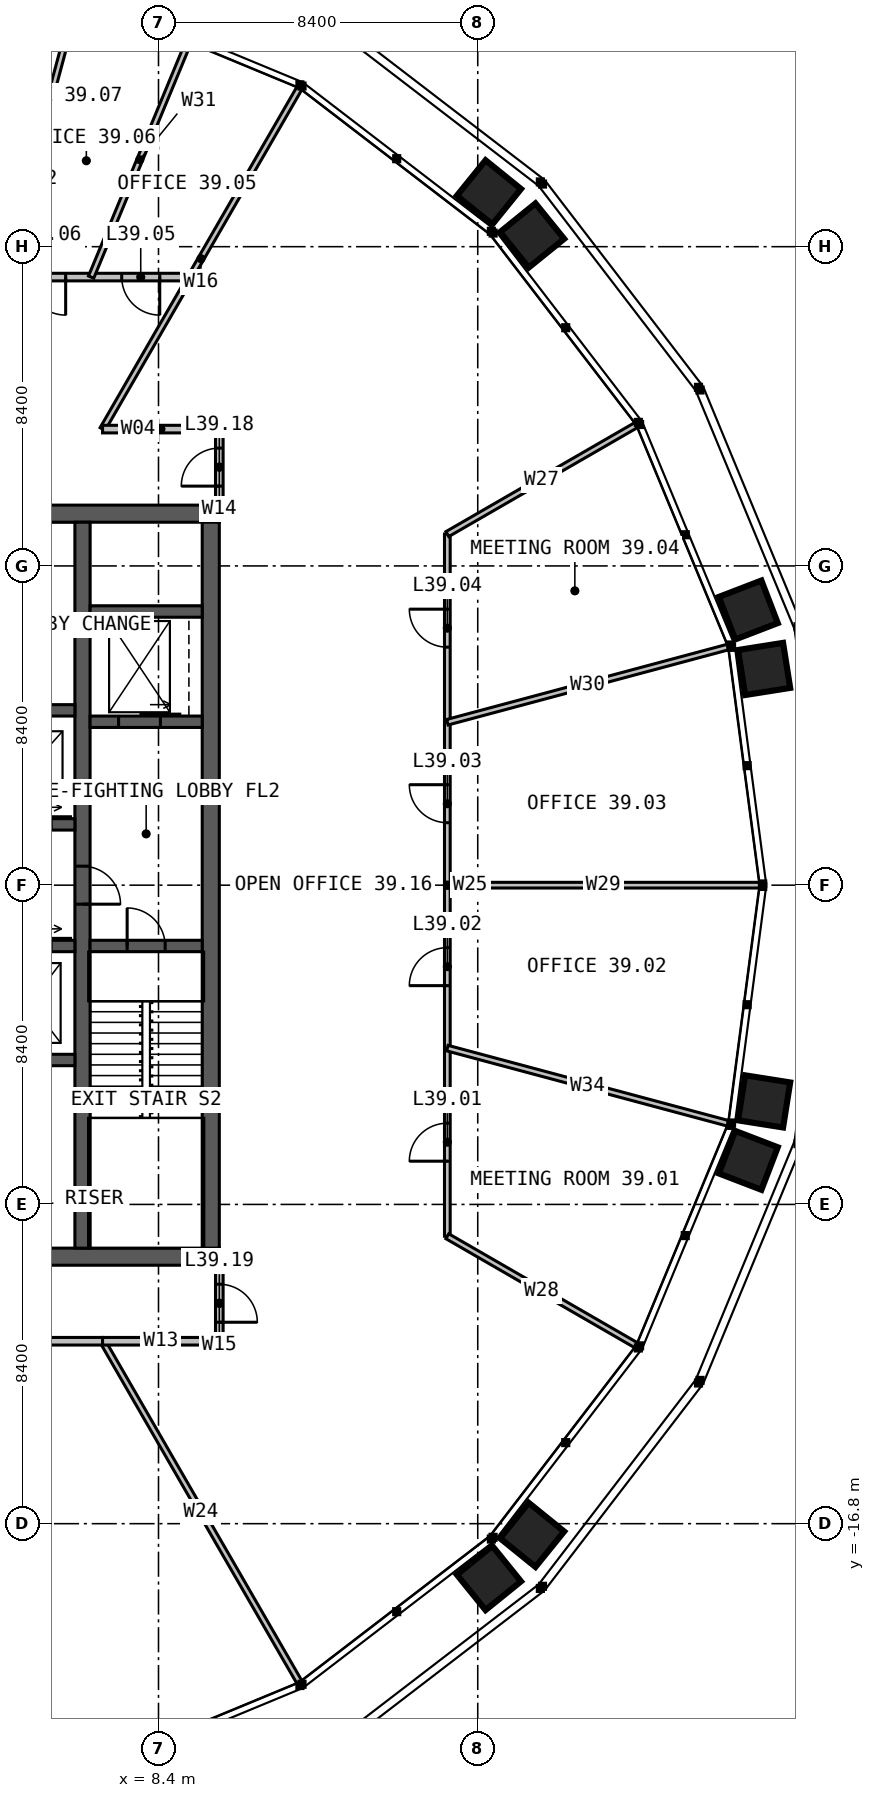
"""IFC4 building model, lengths in metres.
Left out: names, types, materials, properties, quantities, classifications, styles, units other than length and angle.
Written with IfcOpenShell. Run it as: python <this file> out.ifc"""

import sys

from ifc_helpers import new_model, si_unit, direction, frame, frame_2d, origin, place, context, subcontext, project, spatial, rectangle, extrude, element, fill, save


model = new_model("IFC4")
c1 = context("Model", 3, precision=1e-05, world=origin(), true_north=direction((0.0, 1.0)))
c2 = subcontext(c1, "Body", "Model", "MODEL_VIEW")
j1 = project(units=[si_unit("LENGTHUNIT", "METRE"), si_unit("PLANEANGLEUNIT", "RADIAN")], contexts=[c1])
p1 = place(None, origin())
s1 = spatial("IfcSite", under=j1, at=p1, CompositionType="ELEMENT")
p2 = place(p1, origin())
s2 = spatial("IfcBuilding", under=s1, at=p2, CompositionType="ELEMENT")
p3 = place(p2, frame((0.0, 0.0, 163.0)))
s3 = spatial("IfcBuildingStorey", under=s2, at=p3, CompositionType="ELEMENT", Elevation=163.0)
p4 = place(p3, frame((-10.0, 9.775, 0.0), z_axis=(0.0, 0.0, 1.0), x_axis=(1.0, 0.0, 0.0)))
e1 = element("IfcWall", 1, at=p4, inside=s3, PredefinedType="SOLIDWALL", context=c2, shape_type="SweptSolid", body=[
    extrude(rectangle(XDim=20.0, YDim=0.45, at=frame_2d((10.0, 0.0))), origin(), (0.0, 0.0, 1.0), 4.0),
])
p5 = place(p4, frame((9.4, 0.0, 0.0)))
e2 = element("IfcOpeningElement", 2, at=p5, cuts=e1, PredefinedType="OPENING", context=c2, shape_type="SweptSolid", body=[
    extrude(rectangle(XDim=1.2, YDim=2.2, at=frame_2d((0.6, 1.1))), frame((0.0, 0.235, 0.0), z_axis=(0.0, -1.0, 0.0), x_axis=(1.0, 0.0, 0.0)), (0.0, 0.0, 1.0), 0.47),
])
p6 = place(p3, frame((10.0, -9.775, 0.0), z_axis=(0.0, 0.0, 1.0), x_axis=(-1.0, 0.0, 0.0)))
e3 = element("IfcWall", 3, at=p6, inside=s3, PredefinedType="SOLIDWALL", context=c2, shape_type="SweptSolid", body=[
    extrude(rectangle(XDim=20.0, YDim=0.45, at=frame_2d((10.0, 0.0))), origin(), (0.0, 0.0, 1.0), 4.0),
])
p7 = place(p6, frame((6.875, 0.0, 0.0)))
e4 = element("IfcOpeningElement", 4, at=p7, cuts=e3, PredefinedType="OPENING", context=c2, shape_type="SweptSolid", body=[
    extrude(rectangle(XDim=1.2, YDim=2.2, at=frame_2d((0.6, 1.1))), frame((0.0, 0.235, 0.0), z_axis=(0.0, -1.0, 0.0), x_axis=(1.0, 0.0, 0.0)), (0.0, 0.0, 1.0), 0.47),
])
p8 = place(p3, frame((9.775, -9.55, 0.0), z_axis=(0.0, 0.0, 1.0), x_axis=(0.0, 1.0, 0.0)))
e5 = element("IfcWall", 5, at=p8, inside=s3, PredefinedType="SOLIDWALL", context=c2, shape_type="SweptSolid", body=[
    extrude(rectangle(XDim=19.1, YDim=0.45, at=frame_2d((9.55, 0.0))), origin(), (0.0, 0.0, 1.0), 4.0),
])
p9 = place(p3, frame((6.4, 9.55, 0.0), z_axis=(0.0, 0.0, 1.0), x_axis=(0.0, -1.0, 0.0)))
e6 = element("IfcWall", 6, at=p9, inside=s3, PredefinedType="SOLIDWALL", context=c2, shape_type="SweptSolid", body=[
    extrude(rectangle(XDim=19.1, YDim=0.4, at=frame_2d((9.55, 0.0))), origin(), (0.0, 0.0, 1.0), 4.0),
])
p10 = place(p9, frame((9.05, 0.0, 0.0)))
e7 = element("IfcOpeningElement", 7, at=p10, cuts=e6, PredefinedType="OPENING", context=c2, shape_type="SweptSolid", body=[
    extrude(rectangle(XDim=1.0, YDim=2.2, at=frame_2d((0.5, 1.1))), frame((0.0, 0.21, 0.0), z_axis=(0.0, -1.0, 0.0), x_axis=(1.0, 0.0, 0.0)), (0.0, 0.0, 1.0), 0.42),
])
p11 = place(p3, frame((1.35, 1.6, 0.0), z_axis=(0.0, 0.0, 1.0), x_axis=(1.0, 0.0, 0.0)))
e8 = element("IfcWall", 8, at=p11, inside=s3, PredefinedType="SOLIDWALL", context=c2, shape_type="SweptSolid", body=[
    extrude(rectangle(XDim=4.85, YDim=0.3, at=frame_2d((2.425, 0.0))), origin(), (0.0, 0.0, 1.0), 4.0),
])
p12 = place(p11, frame((0.6, 0.0, 0.0)))
e9 = element("IfcOpeningElement", 9, at=p12, cuts=e8, PredefinedType="OPENING", context=c2, shape_type="SweptSolid", body=[
    extrude(rectangle(XDim=1.1, YDim=2.2, at=frame_2d((0.55, 1.1))), frame((0.0, 0.16, 0.0), z_axis=(0.0, -1.0, 0.0), x_axis=(1.0, 0.0, 0.0)), (0.0, 0.0, 1.0), 0.32),
])
p13 = place(p11, frame((3.125, 0.0, 0.0)))
e10 = element("IfcOpeningElement", 10, at=p13, cuts=e8, PredefinedType="OPENING", context=c2, shape_type="SweptSolid", body=[
    extrude(rectangle(XDim=1.1, YDim=2.2, at=frame_2d((0.55, 1.1))), frame((0.0, 0.16, 0.0), z_axis=(0.0, -1.0, 0.0), x_axis=(1.0, 0.0, 0.0)), (0.0, 0.0, 1.0), 0.32),
])
p14 = place(p3, frame((1.35, 4.6, 0.0), z_axis=(0.0, 0.0, 1.0), x_axis=(1.0, 0.0, 0.0)))
e11 = element("IfcWall", 11, at=p14, inside=s3, PredefinedType="SOLIDWALL", context=c2, shape_type="SweptSolid", body=[
    extrude(rectangle(XDim=4.85, YDim=0.3, at=frame_2d((2.425, 0.0))), origin(), (0.0, 0.0, 1.0), 4.0),
])
p15 = place(p3, frame((3.85, -1.6, 0.0), z_axis=(0.0, 0.0, 1.0), x_axis=(1.0, 0.0, 0.0)))
e12 = element("IfcWall", 12, at=p15, inside=s3, PredefinedType="SOLIDWALL", context=c2, shape_type="SweptSolid", body=[
    extrude(rectangle(XDim=2.35, YDim=0.3, at=frame_2d((1.175, 0.0))), origin(), (0.0, 0.0, 1.0), 4.0),
])
p16 = place(p15, frame((0.625, 0.0, 0.0)))
e13 = element("IfcOpeningElement", 13, at=p16, cuts=e12, PredefinedType="OPENING", context=c2, shape_type="SweptSolid", body=[
    extrude(rectangle(XDim=1.1, YDim=2.2, at=frame_2d((0.55, 1.1))), frame((0.0, 0.16, 0.0), z_axis=(0.0, -1.0, 0.0), x_axis=(1.0, 0.0, 0.0)), (0.0, 0.0, 1.0), 0.32),
])
p17 = place(p3, frame((3.85, -4.6, 0.0), z_axis=(0.0, 0.0, 1.0), x_axis=(1.0, 0.0, 0.0)))
e14 = element("IfcWall", 14, at=p17, inside=s3, PredefinedType="SOLIDWALL", context=c2, shape_type="SweptSolid", body=[
    extrude(rectangle(XDim=2.35, YDim=0.3, at=frame_2d((1.175, 0.0))), origin(), (0.0, 0.0, 1.0), 4.0),
])
p18 = place(p3, frame((6.6, -1.6, 0.0), z_axis=(0.0, 0.0, 1.0), x_axis=(1.0, 0.0, 0.0)))
e15 = element("IfcWall", 15, at=p18, inside=s3, PredefinedType="SOLIDWALL", context=c2, shape_type="SweptSolid", body=[
    extrude(rectangle(XDim=2.95, YDim=0.3, at=frame_2d((1.475, 0.0))), origin(), (0.0, 0.0, 1.0), 4.0),
])
p19 = place(p18, frame((0.975, 0.0, 0.0)))
e16 = element("IfcOpeningElement", 16, at=p19, cuts=e15, PredefinedType="OPENING", context=c2, shape_type="SweptSolid", body=[
    extrude(rectangle(XDim=1.0, YDim=2.2, at=frame_2d((0.5, 1.1))), frame((0.0, 0.16, 0.0), z_axis=(0.0, -1.0, 0.0), x_axis=(1.0, 0.0, 0.0)), (0.0, 0.0, 1.0), 0.32),
])
p20 = place(p3, frame((6.6, 4.3, 0.0), z_axis=(0.0, 0.0, 1.0), x_axis=(1.0, 0.0, 0.0)))
e17 = element("IfcWall", 17, at=p20, inside=s3, PredefinedType="SOLIDWALL", context=c2, shape_type="SweptSolid", body=[
    extrude(rectangle(XDim=2.95, YDim=0.3, at=frame_2d((1.475, 0.0))), origin(), (0.0, 0.0, 1.0), 4.0),
])
p21 = place(p20, frame((0.75, 0.0, 0.0)))
e18 = element("IfcOpeningElement", 18, at=p21, cuts=e17, PredefinedType="OPENING", context=c2, shape_type="SweptSolid", body=[
    extrude(rectangle(XDim=1.1, YDim=2.2, at=frame_2d((0.55, 1.1))), frame((0.0, 0.16, 0.0), z_axis=(0.0, -1.0, 0.0), x_axis=(1.0, 0.0, 0.0)), (0.0, 0.0, 1.0), 0.32),
])
p22 = place(p3, frame((6.6, 7.2, 0.0), z_axis=(0.0, 0.0, 1.0), x_axis=(1.0, 0.0, 0.0)))
e19 = element("IfcWall", 19, at=p22, inside=s3, PredefinedType="SOLIDWALL", context=c2, shape_type="SweptSolid", body=[
    extrude(rectangle(XDim=2.95, YDim=0.3, at=frame_2d((1.475, 0.0))), origin(), (0.0, 0.0, 1.0), 4.0),
])
p23 = place(p3, frame((1.35, 6.8, 0.0), z_axis=(0.0, 0.0, 1.0), x_axis=(1.0, 0.0, 0.0)))
e20 = element("IfcWall", 20, at=p23, inside=s3, PredefinedType="PARTITIONING", context=c2, shape_type="SweptSolid", body=[
    extrude(rectangle(XDim=4.85, YDim=0.15, at=frame_2d((2.425, 0.0))), origin(), (0.0, 0.0, 1.0), 3.75),
])
for number, where, z_axis, x_axis in (
    (21, (6.928, 12.0, 0.0), (0.0, 0.0, 1.0), (0.5, 0.866, 0.0)),
    (22, (6.928, -12.0, 0.0), (0.0, 0.0, 1.0), (0.5, -0.866, 0.0)),
):
    element("IfcWall", number, at=place(p3, frame(where, z_axis=z_axis, x_axis=x_axis)), inside=s3, PredefinedType="PARTITIONING", context=c2, shape_type="SweptSolid", body=[
        extrude(rectangle(XDim=10.355, YDim=0.15, at=frame_2d((5.177, 0.0))), origin(), (0.0, 0.0, 1.0), 2.79),
    ])
p24 = place(p3, frame((16.0, -9.238, 0.0), z_axis=(0.0, 0.0, 1.0), x_axis=(0.0, 1.0, 0.0)))
e23 = element("IfcWall", 23, at=p24, inside=s3, PredefinedType="PARTITIONING", context=c2, shape_type="SweptSolid", body=[
    extrude(rectangle(XDim=18.475, YDim=0.15, at=frame_2d((9.238, 0.0))), origin(), (0.0, 0.0, 1.0), 2.79),
])
p25 = place(p24, frame((1.975, 0.0, 0.0)))
e24 = element("IfcOpeningElement", 24, at=p25, cuts=e23, PredefinedType="OPENING", context=c2, shape_type="SweptSolid", body=[
    extrude(rectangle(XDim=1.0, YDim=2.2, at=frame_2d((0.5, 1.1))), frame((0.0, 0.085, 0.0), z_axis=(0.0, -1.0, 0.0), x_axis=(1.0, 0.0, 0.0)), (0.0, 0.0, 1.0), 0.17),
])
p26 = place(p24, frame((6.594, 0.0, 0.0)))
e25 = element("IfcOpeningElement", 25, at=p26, cuts=e23, PredefinedType="OPENING", context=c2, shape_type="SweptSolid", body=[
    extrude(rectangle(XDim=1.0, YDim=2.2, at=frame_2d((0.5, 1.1))), frame((0.0, 0.085, 0.0), z_axis=(0.0, -1.0, 0.0), x_axis=(1.0, 0.0, 0.0)), (0.0, 0.0, 1.0), 0.17),
])
p27 = place(p24, frame((10.881, 0.0, 0.0)))
e26 = element("IfcOpeningElement", 26, at=p27, cuts=e23, PredefinedType="OPENING", context=c2, shape_type="SweptSolid", body=[
    extrude(rectangle(XDim=1.0, YDim=2.2, at=frame_2d((0.5, 1.1))), frame((0.0, 0.085, 0.0), z_axis=(0.0, -1.0, 0.0), x_axis=(1.0, 0.0, 0.0)), (0.0, 0.0, 1.0), 0.17),
])
p28 = place(p24, frame((15.5, 0.0, 0.0)))
e27 = element("IfcOpeningElement", 27, at=p28, cuts=e23, PredefinedType="OPENING", context=c2, shape_type="SweptSolid", body=[
    extrude(rectangle(XDim=1.0, YDim=2.2, at=frame_2d((0.5, 1.1))), frame((0.0, 0.085, 0.0), z_axis=(0.0, -1.0, 0.0), x_axis=(1.0, 0.0, 0.0)), (0.0, 0.0, 1.0), 0.17),
])
for number, where, z_axis, x_axis in (
    (28, (16.0, -9.238, 0.0), (0.0, 0.0, 1.0), (0.866, -0.5, 0.0)),
    (29, (16.0, 9.238, 0.0), (0.0, 0.0, 1.0), (0.866, 0.5, 0.0)),
):
    element("IfcWall", number, at=place(p3, frame(where, z_axis=z_axis, x_axis=x_axis)), inside=s3, PredefinedType="PARTITIONING", context=c2, shape_type="SweptSolid", body=[
        extrude(rectangle(XDim=5.736, YDim=0.15, at=frame_2d((2.868, 0.0))), origin(), (0.0, 0.0, 1.0), 2.79),
    ])
p29 = place(p3, frame((16.0, -4.287, 0.0), z_axis=(0.0, 0.0, 1.0), x_axis=(0.965922113611, -0.25883290061, 0.0)))
e30 = element("IfcWall", 30, at=p29, inside=s3, PredefinedType="PARTITIONING", context=c2, shape_type="SweptSolid", body=[
    extrude(rectangle(XDim=7.647, YDim=0.15, at=frame_2d((3.823, 0.0))), origin(), (0.0, 0.0, 1.0), 2.79),
])
p30 = place(p3, frame((16.0, 0.0, 0.0), z_axis=(0.0, 0.0, 1.0), x_axis=(1.0, 0.0, 0.0)))
e31 = element("IfcWall", 31, at=p30, inside=s3, PredefinedType="PARTITIONING", context=c2, shape_type="SweptSolid", body=[
    extrude(rectangle(XDim=8.211, YDim=0.15, at=frame_2d((4.105, 0.0))), origin(), (0.0, 0.0, 1.0), 2.79),
])
p31 = place(p3, frame((16.0, 4.287, 0.0), z_axis=(0.0, 0.0, 1.0), x_axis=(0.965922113611, 0.25883290061, 0.0)))
e32 = element("IfcWall", 32, at=p31, inside=s3, PredefinedType="PARTITIONING", context=c2, shape_type="SweptSolid", body=[
    extrude(rectangle(XDim=7.647, YDim=0.15, at=frame_2d((3.823, 0.0))), origin(), (0.0, 0.0, 1.0), 2.79),
])
p32 = place(p3, frame((10.0, 12.0, 0.0), z_axis=(0.0, 0.0, 1.0), x_axis=(-1.0, 0.0, 0.0)))
e33 = element("IfcWall", 33, at=p32, inside=s3, PredefinedType="PARTITIONING", context=c2, shape_type="SweptSolid", body=[
    extrude(rectangle(XDim=3.072, YDim=0.2, at=frame_2d((1.536, 0.0))), origin(), (0.0, 0.0, 1.0), 3.8),
])
p33 = place(p3, frame((9.238, 16.0, 0.0), z_axis=(0.0, 0.0, 1.0), x_axis=(-1.0, 0.0, 0.0)))
e34 = element("IfcWall", 34, at=p33, inside=s3, PredefinedType="PARTITIONING", context=c2, shape_type="SweptSolid", body=[
    extrude(rectangle(XDim=9.238, YDim=0.2, at=frame_2d((4.619, 0.0))), origin(), (0.0, 0.0, 1.0), 3.8),
])
p34 = place(p33, frame((0.805, 0.0, 0.0)))
e35 = element("IfcOpeningElement", 35, at=p34, cuts=e34, PredefinedType="OPENING", context=c2, shape_type="SweptSolid", body=[
    extrude(rectangle(XDim=1.0, YDim=2.2, at=frame_2d((0.5, 1.1))), frame((0.0, 0.11, 0.0), z_axis=(0.0, -1.0, 0.0), x_axis=(1.0, 0.0, 0.0)), (0.0, 0.0, 1.0), 0.22),
])
p35 = place(p33, frame((3.28, 0.0, 0.0)))
e36 = element("IfcOpeningElement", 36, at=p35, cuts=e34, PredefinedType="OPENING", context=c2, shape_type="SweptSolid", body=[
    extrude(rectangle(XDim=1.0, YDim=2.2, at=frame_2d((0.5, 1.1))), frame((0.0, 0.11, 0.0), z_axis=(0.0, -1.0, 0.0), x_axis=(1.0, 0.0, 0.0)), (0.0, 0.0, 1.0), 0.22),
])
p36 = place(p33, frame((5.541, 0.0, 0.0)))
e37 = element("IfcOpeningElement", 37, at=p36, cuts=e34, PredefinedType="OPENING", context=c2, shape_type="SweptSolid", body=[
    extrude(rectangle(XDim=1.0, YDim=2.2, at=frame_2d((0.5, 1.1))), frame((0.0, 0.11, 0.0), z_axis=(0.0, -1.0, 0.0), x_axis=(1.0, 0.0, 0.0)), (0.0, 0.0, 1.0), 0.22),
])
p37 = place(p33, frame((7.684, 0.0, 0.0)))
e38 = element("IfcOpeningElement", 38, at=p37, cuts=e34, PredefinedType="OPENING", context=c2, shape_type="SweptSolid", body=[
    extrude(rectangle(XDim=1.0, YDim=2.2, at=frame_2d((0.5, 1.1))), frame((0.0, 0.11, 0.0), z_axis=(0.0, -1.0, 0.0), x_axis=(1.0, 0.0, 0.0)), (0.0, 0.0, 1.0), 0.22),
])
p38 = place(p3, frame((6.627, 16.0, 0.0), z_axis=(0.0, 0.0, 1.0), x_axis=(0.382682891863, 0.923879756395, 0.0)))
e39 = element("IfcWall", 39, at=p38, inside=s3, PredefinedType="PARTITIONING", context=c2, shape_type="SweptSolid", body=[
    extrude(rectangle(XDim=6.686, YDim=0.15, at=frame_2d((3.343, 0.0))), origin(), (0.0, 0.0, 1.0), 2.79),
])
p39 = place(p3, frame((4.287, 16.0, 0.0), z_axis=(0.0, 0.0, 1.0), x_axis=(0.25883290061, 0.965922113611, 0.0)))
e40 = element("IfcWall", 40, at=p39, inside=s3, PredefinedType="PARTITIONING", context=c2, shape_type="SweptSolid", body=[
    extrude(rectangle(XDim=7.647, YDim=0.15, at=frame_2d((3.823, 0.0))), origin(), (0.0, 0.0, 1.0), 2.79),
])
p40 = place(p3, frame((-6.928, -12.0, 0.0), z_axis=(0.0, 0.0, 1.0), x_axis=(1.0, 0.0, 0.0)))
e41 = element("IfcWall", 41, at=p40, inside=s3, PredefinedType="PARTITIONING", context=c2, shape_type="SweptSolid", body=[
    extrude(rectangle(XDim=13.856, YDim=0.2, at=frame_2d((6.928, 0.0))), origin(), (0.0, 0.0, 1.0), 3.8),
])
p41 = place(p40, frame((6.028, 0.0, 0.0)))
e42 = element("IfcOpeningElement", 42, at=p41, cuts=e41, PredefinedType="OPENING", context=c2, shape_type="SweptSolid", body=[
    extrude(rectangle(XDim=1.8, YDim=2.2, at=frame_2d((0.9, 1.1))), frame((0.0, 0.11, 0.0), z_axis=(0.0, -1.0, 0.0), x_axis=(1.0, 0.0, 0.0)), (0.0, 0.0, 1.0), 0.22),
])
p42 = place(p3, frame((6.928, -12.0, 0.0), z_axis=(0.0, 0.0, 1.0), x_axis=(1.0, 0.0, 0.0)))
e43 = element("IfcWall", 43, at=p42, inside=s3, PredefinedType="PARTITIONING", context=c2, shape_type="SweptSolid", body=[
    extrude(rectangle(XDim=3.072, YDim=0.2, at=frame_2d((1.536, 0.0))), origin(), (0.0, 0.0, 1.0), 3.8),
])
p43 = place(p3, frame((10.0, 10.0, 0.0), z_axis=(0.0, 0.0, 1.0), x_axis=(0.0, 1.0, 0.0)))
e44 = element("IfcWall", 44, at=p43, inside=s3, PredefinedType="PARTITIONING", context=c2, shape_type="SweptSolid", body=[
    extrude(rectangle(XDim=2.0, YDim=0.2, at=frame_2d((1.0, 0.0))), origin(), (0.0, 0.0, 1.0), 3.8),
])
p44 = place(p43, frame((0.5, 0.0, 0.0)))
e45 = element("IfcOpeningElement", 45, at=p44, cuts=e44, PredefinedType="OPENING", context=c2, shape_type="SweptSolid", body=[
    extrude(rectangle(XDim=1.0, YDim=2.2, at=frame_2d((0.5, 1.1))), frame((0.0, 0.11, 0.0), z_axis=(0.0, -1.0, 0.0), x_axis=(1.0, 0.0, 0.0)), (0.0, 0.0, 1.0), 0.22),
])
p45 = place(p3, frame((10.0, -10.0, 0.0), z_axis=(0.0, 0.0, 1.0), x_axis=(0.0, -1.0, 0.0)))
e46 = element("IfcWall", 46, at=p45, inside=s3, PredefinedType="PARTITIONING", context=c2, shape_type="SweptSolid", body=[
    extrude(rectangle(XDim=2.0, YDim=0.2, at=frame_2d((1.0, 0.0))), origin(), (0.0, 0.0, 1.0), 3.8),
])
p46 = place(p45, frame((0.5, 0.0, 0.0)))
e47 = element("IfcOpeningElement", 47, at=p46, cuts=e46, PredefinedType="OPENING", context=c2, shape_type="SweptSolid", body=[
    extrude(rectangle(XDim=1.0, YDim=2.2, at=frame_2d((0.5, 1.1))), frame((0.0, 0.11, 0.0), z_axis=(0.0, -1.0, 0.0), x_axis=(1.0, 0.0, 0.0)), (0.0, 0.0, 1.0), 0.22),
])
p47 = place(p10, origin())
e48 = element("IfcDoor", 48, at=p47, inside=s3, OperationType="SINGLE_SWING_RIGHT", PredefinedType="DOOR", context=c2, shape_type="SweptSolid", body=[
    extrude(rectangle(XDim=1.0, YDim=2.2, at=frame_2d((0.5, 1.1))), frame((0.0, 0.025, 0.0), z_axis=(0.0, -1.0, 0.0), x_axis=(1.0, 0.0, 0.0)), (0.0, 0.0, 1.0), 0.05),
])
fill(e7, e48)
p48 = place(p19, origin())
e49 = element("IfcDoor", 49, at=p48, inside=s3, OperationType="SINGLE_SWING_LEFT", PredefinedType="DOOR", context=c2, shape_type="SweptSolid", body=[
    extrude(rectangle(XDim=1.0, YDim=2.2, at=frame_2d((0.5, 1.1))), frame((0.0, 0.025, 0.0), z_axis=(0.0, -1.0, 0.0), x_axis=(1.0, 0.0, 0.0)), (0.0, 0.0, 1.0), 0.05),
])
fill(e16, e49)
p49 = place(p21, origin())
e50 = element("IfcDoor", 50, at=p49, inside=s3, OperationType="SLIDING_TO_LEFT", PredefinedType="DOOR", context=c2, shape_type="SweptSolid", body=[
    extrude(rectangle(XDim=1.1, YDim=2.2, at=frame_2d((0.55, 1.1))), frame((0.0, 0.025, 0.0), z_axis=(0.0, -1.0, 0.0), x_axis=(1.0, 0.0, 0.0)), (0.0, 0.0, 1.0), 0.05),
])
fill(e18, e50)
p50 = place(p25, origin())
e51 = element("IfcDoor", 51, at=p50, inside=s3, OperationType="SINGLE_SWING_LEFT", PredefinedType="DOOR", context=c2, shape_type="SweptSolid", body=[
    extrude(rectangle(XDim=1.0, YDim=2.2, at=frame_2d((0.5, 1.1))), frame((0.0, 0.025, 0.0), z_axis=(0.0, -1.0, 0.0), x_axis=(1.0, 0.0, 0.0)), (0.0, 0.0, 1.0), 0.05),
])
fill(e24, e51)
p51 = place(p26, origin())
e52 = element("IfcDoor", 52, at=p51, inside=s3, OperationType="SINGLE_SWING_LEFT", PredefinedType="DOOR", context=c2, shape_type="SweptSolid", body=[
    extrude(rectangle(XDim=1.0, YDim=2.2, at=frame_2d((0.5, 1.1))), frame((0.0, 0.025, 0.0), z_axis=(0.0, -1.0, 0.0), x_axis=(1.0, 0.0, 0.0)), (0.0, 0.0, 1.0), 0.05),
])
fill(e25, e52)
p52 = place(p27, origin())
e53 = element("IfcDoor", 53, at=p52, inside=s3, OperationType="SINGLE_SWING_RIGHT", PredefinedType="DOOR", context=c2, shape_type="SweptSolid", body=[
    extrude(rectangle(XDim=1.0, YDim=2.2, at=frame_2d((0.5, 1.1))), frame((0.0, 0.025, 0.0), z_axis=(0.0, -1.0, 0.0), x_axis=(1.0, 0.0, 0.0)), (0.0, 0.0, 1.0), 0.05),
])
fill(e26, e53)
p53 = place(p28, origin())
e54 = element("IfcDoor", 54, at=p53, inside=s3, OperationType="SINGLE_SWING_RIGHT", PredefinedType="DOOR", context=c2, shape_type="SweptSolid", body=[
    extrude(rectangle(XDim=1.0, YDim=2.2, at=frame_2d((0.5, 1.1))), frame((0.0, 0.025, 0.0), z_axis=(0.0, -1.0, 0.0), x_axis=(1.0, 0.0, 0.0)), (0.0, 0.0, 1.0), 0.05),
])
fill(e27, e54)
p54 = place(p34, origin())
e55 = element("IfcDoor", 55, at=p54, inside=s3, OperationType="SINGLE_SWING_LEFT", PredefinedType="DOOR", context=c2, shape_type="SweptSolid", body=[
    extrude(rectangle(XDim=1.0, YDim=2.2, at=frame_2d((0.5, 1.1))), frame((0.0, 0.025, 0.0), z_axis=(0.0, -1.0, 0.0), x_axis=(1.0, 0.0, 0.0)), (0.0, 0.0, 1.0), 0.05),
])
fill(e35, e55)
p55 = place(p35, origin())
e56 = element("IfcDoor", 56, at=p55, inside=s3, OperationType="SINGLE_SWING_LEFT", PredefinedType="DOOR", context=c2, shape_type="SweptSolid", body=[
    extrude(rectangle(XDim=1.0, YDim=2.2, at=frame_2d((0.5, 1.1))), frame((0.0, 0.025, 0.0), z_axis=(0.0, -1.0, 0.0), x_axis=(1.0, 0.0, 0.0)), (0.0, 0.0, 1.0), 0.05),
])
fill(e36, e56)
p56 = place(p44, origin())
e57 = element("IfcDoor", 57, at=p56, inside=s3, OperationType="SINGLE_SWING_LEFT", PredefinedType="DOOR", context=c2, shape_type="SweptSolid", body=[
    extrude(rectangle(XDim=1.0, YDim=2.2, at=frame_2d((0.5, 1.1))), frame((0.0, 0.025, 0.0), z_axis=(0.0, -1.0, 0.0), x_axis=(1.0, 0.0, 0.0)), (0.0, 0.0, 1.0), 0.05),
])
fill(e45, e57)
p57 = place(p46, origin())
e58 = element("IfcDoor", 58, at=p57, inside=s3, OperationType="SINGLE_SWING_RIGHT", PredefinedType="DOOR", context=c2, shape_type="SweptSolid", body=[
    extrude(rectangle(XDim=1.0, YDim=2.2, at=frame_2d((0.5, 1.1))), frame((0.0, 0.025, 0.0), z_axis=(0.0, -1.0, 0.0), x_axis=(1.0, 0.0, 0.0)), (0.0, 0.0, 1.0), 0.05),
])
fill(e47, e58)
save(model, sys.argv[1])
